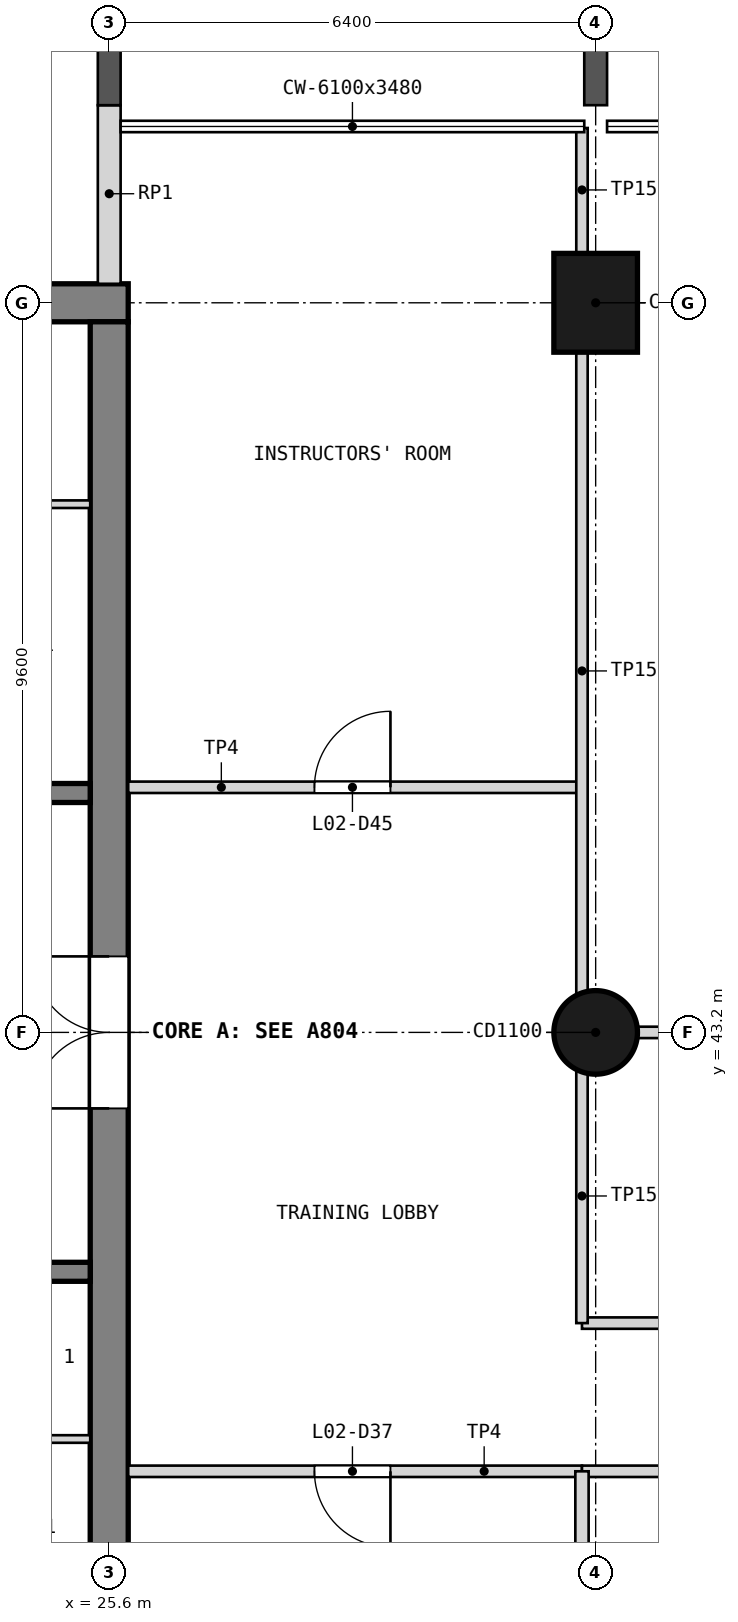
"""IFC4 building model, lengths in metres.
Left out: names, types, materials, properties, quantities, classifications, styles, units other than length and angle.
Written with IfcOpenShell. Run it as: python <this file> out.ifc"""

import sys

from ifc_helpers import new_model, si_unit, direction, frame, frame_2d, origin, origin_2d, place, context, subcontext, project, spatial, rectangle, circle, extrude, element, fill, save


model = new_model("IFC4")
c1 = context("Model", 3, precision=1e-05, world=origin(), true_north=direction((0.0, 1.0)))
c2 = subcontext(c1, "Body", "Model", "MODEL_VIEW")
j1 = project(units=[si_unit("LENGTHUNIT", "METRE"), si_unit("PLANEANGLEUNIT", "RADIAN")], contexts=[c1])
p1 = place(None, origin())
s1 = spatial("IfcSite", under=j1, at=p1, CompositionType="ELEMENT")
p2 = place(p1, origin())
s2 = spatial("IfcBuilding", under=s1, at=p2, CompositionType="ELEMENT")
p3 = place(p2, frame((0.0, 0.0, 8.4)))
s3 = spatial("IfcBuildingStorey", under=s2, at=p3, CompositionType="ELEMENT", Elevation=8.4)
p4 = place(p3, frame((12.55, 52.8, 0.0), z_axis=(0.0, 0.0, 1.0), x_axis=(1.0, 0.0, 0.0)))
e1 = element("IfcWall", 1, at=p4, inside=s3, PredefinedType="SHEAR", context=c2, shape_type="SweptSolid", body=[
    extrude(rectangle(XDim=13.3, YDim=0.5, at=frame_2d((6.65, 0.0))), origin(), (0.0, 0.0, 1.0), 4.5),
])
p5 = place(p4, frame((1.85, 0.0, 1.0)))
e2 = element("IfcOpeningElement", 2, at=p5, cuts=e1, PredefinedType="OPENING", context=c2, shape_type="SweptSolid", body=[
    extrude(rectangle(XDim=0.4, YDim=2.0, at=frame_2d((0.2, 1.0))), frame((0.0, 0.26, 0.0), z_axis=(0.0, -1.0, 0.0), x_axis=(1.0, 0.0, 0.0)), (0.0, 0.0, 1.0), 0.52),
])
p6 = place(p4, frame((4.65, 0.0, 0.0)))
e3 = element("IfcOpeningElement", 3, at=p6, cuts=e1, PredefinedType="OPENING", context=c2, shape_type="SweptSolid", body=[
    extrude(rectangle(XDim=2.0, YDim=2.1, at=frame_2d((1.0, 1.05))), frame((0.0, 0.26, 0.0), z_axis=(0.0, -1.0, 0.0), x_axis=(1.0, 0.0, 0.0)), (0.0, 0.0, 1.0), 0.52),
])
p7 = place(p3, frame((25.6, 33.85, 0.0), z_axis=(0.0, 0.0, 1.0), x_axis=(0.0, 1.0, 0.0)))
e4 = element("IfcWall", 4, at=p7, inside=s3, PredefinedType="SHEAR", context=c2, shape_type="SweptSolid", body=[
    extrude(rectangle(XDim=18.7, YDim=0.5, at=frame_2d((9.35, 0.0))), origin(), (0.0, 0.0, 1.0), 4.5),
])
p8 = place(p7, frame((8.35, 0.0, 0.0)))
e5 = element("IfcOpeningElement", 5, at=p8, cuts=e4, PredefinedType="OPENING", context=c2, shape_type="SweptSolid", body=[
    extrude(rectangle(XDim=2.0, YDim=2.1, at=frame_2d((1.0, 1.05))), frame((0.0, 0.26, 0.0), z_axis=(0.0, -1.0, 0.0), x_axis=(1.0, 0.0, 0.0)), (0.0, 0.0, 1.0), 0.52),
])
p9 = place(p3, frame((32.0, 43.2, 0.0), z_axis=(0.0, 0.0, 1.0), x_axis=(1.0, 0.0, 0.0)))
e6 = element("IfcColumn", 6, at=p9, inside=s3, PredefinedType="COLUMN", context=c2, shape_type="SweptSolid", body=[
    extrude(circle(Radius=0.55, at=origin_2d()), origin(), (0.0, 0.0, 1.0), 4.5),
])
p10 = place(p3, frame((32.0, 52.8, 0.0), z_axis=(0.0, 0.0, 1.0), x_axis=(1.0, 0.0, 0.0)))
e7 = element("IfcColumn", 7, at=p10, inside=s3, PredefinedType="COLUMN", context=c2, shape_type="SweptSolid", body=[
    extrude(rectangle(XDim=1.1, YDim=1.3, at=origin_2d()), origin(), (0.0, 0.0, 1.0), 4.5),
])
p11 = place(p3, frame((25.6, 53.05, 0.0), z_axis=(0.0, 0.0, 1.0), x_axis=(0.0, 1.0, 0.0)))
e8 = element("IfcWall", 8, at=p11, inside=s3, PredefinedType="SOLIDWALL", context=c2, shape_type="SweptSolid", body=[
    extrude(rectangle(XDim=2.35, YDim=0.3, at=frame_2d((1.175, 0.0))), origin(), (0.0, 0.0, 1.0), 3.48),
])
for number, where, z_axis, x_axis in (
    (9, (19.875, 40.05, 0.0), (0.0, 0.0, 1.0), (1.0, 0.0, 0.0)),
    (10, (19.875, 46.35, 0.0), (0.0, 0.0, 1.0), (1.0, 0.0, 0.0)),
):
    element("IfcWall", number, at=place(p3, frame(where, z_axis=z_axis, x_axis=x_axis)), inside=s3, PredefinedType="SOLIDWALL", context=c2, shape_type="SweptSolid", body=[
        extrude(rectangle(XDim=5.475, YDim=0.25, at=frame_2d((2.738, 0.0))), origin(), (0.0, 0.0, 1.0), 4.2),
    ])
p12 = place(p3, frame((21.675, 37.85, 0.0), z_axis=(0.0, 0.0, 1.0), x_axis=(1.0, 0.0, 0.0)))
e11 = element("IfcWall", 11, at=p12, inside=s3, PredefinedType="PARTITIONING", context=c2, shape_type="SweptSolid", body=[
    extrude(rectangle(XDim=3.675, YDim=0.1, at=frame_2d((1.837, 0.0))), origin(), (0.0, 0.0, 1.0), 4.2),
])
p13 = place(p3, frame((20.125, 50.15, 0.0), z_axis=(0.0, 0.0, 1.0), x_axis=(1.0, 0.0, 0.0)))
e12 = element("IfcWall", 12, at=p13, inside=s3, PredefinedType="PARTITIONING", context=c2, shape_type="SweptSolid", body=[
    extrude(rectangle(XDim=5.225, YDim=0.1, at=frame_2d((2.613, 0.0))), origin(), (0.0, 0.0, 1.0), 4.2),
])
p14 = place(p3, frame((25.85, 37.425, 0.0), z_axis=(0.0, 0.0, 1.0), x_axis=(1.0, 0.0, 0.0)))
e13 = element("IfcWall", 13, at=p14, inside=s3, PredefinedType="PARTITIONING", context=c2, shape_type="SweptSolid", body=[
    extrude(rectangle(XDim=5.97, YDim=0.15, at=frame_2d((2.985, 0.0))), origin(), (0.0, 0.0, 1.0), 4.28),
])
p15 = place(p14, frame((2.45, 0.0, 0.0)))
e14 = element("IfcOpeningElement", 14, at=p15, cuts=e13, PredefinedType="OPENING", context=c2, shape_type="SweptSolid", body=[
    extrude(rectangle(XDim=1.0, YDim=2.1, at=frame_2d((0.5, 1.05))), frame((0.0, 0.085, 0.0), z_axis=(0.0, -1.0, 0.0), x_axis=(1.0, 0.0, 0.0)), (0.0, 0.0, 1.0), 0.17),
])
p16 = place(p3, frame((31.82, 37.425, 0.0), z_axis=(0.0, 0.0, 1.0), x_axis=(1.0, 0.0, 0.0)))
e15 = element("IfcWall", 15, at=p16, inside=s3, PredefinedType="PARTITIONING", context=c2, shape_type="SweptSolid", body=[
    extrude(rectangle(XDim=6.4, YDim=0.15, at=frame_2d((3.2, 0.0))), origin(), (0.0, 0.0, 1.0), 4.28),
])
p17 = place(p16, frame((2.68, 0.0, 0.0)))
e16 = element("IfcOpeningElement", 16, at=p17, cuts=e15, PredefinedType="OPENING", context=c2, shape_type="SweptSolid", body=[
    extrude(rectangle(XDim=1.0, YDim=2.1, at=frame_2d((0.5, 1.05))), frame((0.0, 0.085, 0.0), z_axis=(0.0, -1.0, 0.0), x_axis=(1.0, 0.0, 0.0)), (0.0, 0.0, 1.0), 0.17),
])
p18 = place(p3, frame((31.82, 34.23, 0.0), z_axis=(0.0, 0.0, 1.0), x_axis=(0.0, 1.0, 0.0)))
e17 = element("IfcWall", 17, at=p18, inside=s3, PredefinedType="PARTITIONING", context=c2, shape_type="SweptSolid", body=[
    extrude(rectangle(XDim=3.195, YDim=0.175, at=frame_2d((1.598, 0.0))), origin(), (0.0, 0.0, 1.0), 3.38),
])
p19 = place(p3, frame((31.82, 39.375, 0.0), z_axis=(0.0, 0.0, 1.0), x_axis=(1.0, 0.0, 0.0)))
e18 = element("IfcWall", 18, at=p19, inside=s3, PredefinedType="PARTITIONING", context=c2, shape_type="SweptSolid", body=[
    extrude(rectangle(XDim=25.96, YDim=0.15, at=frame_2d((12.98, 0.0))), origin(), (0.0, 0.0, 1.0), 4.28),
])
p20 = place(p19, frame((5.63, 0.0, 0.0)))
e19 = element("IfcOpeningElement", 19, at=p20, cuts=e18, PredefinedType="OPENING", context=c2, shape_type="SweptSolid", body=[
    extrude(rectangle(XDim=1.8, YDim=2.1, at=frame_2d((0.9, 1.05))), frame((0.0, 0.085, 0.0), z_axis=(0.0, -1.0, 0.0), x_axis=(1.0, 0.0, 0.0)), (0.0, 0.0, 1.0), 0.17),
])
p21 = place(p19, frame((18.53, 0.0, 0.0)))
e20 = element("IfcOpeningElement", 20, at=p21, cuts=e18, PredefinedType="OPENING", context=c2, shape_type="SweptSolid", body=[
    extrude(rectangle(XDim=1.8, YDim=2.1, at=frame_2d((0.9, 1.05))), frame((0.0, 0.085, 0.0), z_axis=(0.0, -1.0, 0.0), x_axis=(1.0, 0.0, 0.0)), (0.0, 0.0, 1.0), 0.17),
])
p22 = place(p3, frame((31.82, 43.2, 0.0), z_axis=(0.0, 0.0, 1.0), x_axis=(1.0, 0.0, 0.0)))
e21 = element("IfcWall", 21, at=p22, inside=s3, PredefinedType="PARTITIONING", context=c2, shape_type="SweptSolid", body=[
    extrude(rectangle(XDim=25.96, YDim=0.15, at=frame_2d((12.98, 0.0))), origin(), (0.0, 0.0, 1.0), 3.48),
])
p23 = place(p22, frame((3.175, 0.0, 0.0)))
e22 = element("IfcOpeningElement", 22, at=p23, cuts=e21, PredefinedType="OPENING", context=c2, shape_type="SweptSolid", body=[
    extrude(rectangle(XDim=1.8, YDim=2.1, at=frame_2d((0.9, 1.05))), frame((0.0, 0.085, 0.0), z_axis=(0.0, -1.0, 0.0), x_axis=(1.0, 0.0, 0.0)), (0.0, 0.0, 1.0), 0.17),
])
p24 = place(p22, frame((10.325, 0.0, 0.0)))
e23 = element("IfcOpeningElement", 23, at=p24, cuts=e21, PredefinedType="OPENING", context=c2, shape_type="SweptSolid", body=[
    extrude(rectangle(XDim=1.8, YDim=2.1, at=frame_2d((0.9, 1.05))), frame((0.0, 0.085, 0.0), z_axis=(0.0, -1.0, 0.0), x_axis=(1.0, 0.0, 0.0)), (0.0, 0.0, 1.0), 0.17),
])
p25 = place(p22, frame((17.518, 0.0, 0.0)))
e24 = element("IfcOpeningElement", 24, at=p25, cuts=e21, PredefinedType="OPENING", context=c2, shape_type="SweptSolid", body=[
    extrude(rectangle(XDim=1.0, YDim=2.1, at=frame_2d((0.5, 1.05))), frame((0.0, 0.085, 0.0), z_axis=(0.0, -1.0, 0.0), x_axis=(1.0, 0.0, 0.0)), (0.0, 0.0, 1.0), 0.17),
])
p26 = place(p22, frame((22.607, 0.0, 0.0)))
e25 = element("IfcOpeningElement", 25, at=p26, cuts=e21, PredefinedType="OPENING", context=c2, shape_type="SweptSolid", body=[
    extrude(rectangle(XDim=1.8, YDim=2.1, at=frame_2d((0.9, 1.05))), frame((0.0, 0.085, 0.0), z_axis=(0.0, -1.0, 0.0), x_axis=(1.0, 0.0, 0.0)), (0.0, 0.0, 1.0), 0.17),
])
p27 = place(p3, frame((25.85, 46.425, 0.0), z_axis=(0.0, 0.0, 1.0), x_axis=(1.0, 0.0, 0.0)))
e26 = element("IfcWall", 26, at=p27, inside=s3, PredefinedType="PARTITIONING", context=c2, shape_type="SweptSolid", body=[
    extrude(rectangle(XDim=5.97, YDim=0.15, at=frame_2d((2.985, 0.0))), origin(), (0.0, 0.0, 1.0), 4.28),
])
p28 = place(p27, frame((2.45, 0.0, 0.0)))
e27 = element("IfcOpeningElement", 27, at=p28, cuts=e26, PredefinedType="OPENING", context=c2, shape_type="SweptSolid", body=[
    extrude(rectangle(XDim=1.0, YDim=2.1, at=frame_2d((0.5, 1.05))), frame((0.0, 0.085, 0.0), z_axis=(0.0, -1.0, 0.0), x_axis=(1.0, 0.0, 0.0)), (0.0, 0.0, 1.0), 0.17),
])
p29 = place(p3, frame((31.82, 39.375, 0.0), z_axis=(0.0, 0.0, 1.0), x_axis=(0.0, 1.0, 0.0)))
e28 = element("IfcWall", 28, at=p29, inside=s3, PredefinedType="PARTITIONING", context=c2, shape_type="SweptSolid", body=[
    extrude(rectangle(XDim=3.325, YDim=0.15, at=frame_2d((1.663, 0.0))), origin(), (0.0, 0.0, 1.0), 3.38),
])
p30 = place(p3, frame((31.82, 43.7, 0.0), z_axis=(0.0, 0.0, 1.0), x_axis=(0.0, 1.0, 0.0)))
e29 = element("IfcWall", 29, at=p30, inside=s3, PredefinedType="PARTITIONING", context=c2, shape_type="SweptSolid", body=[
    extrude(rectangle(XDim=8.47, YDim=0.15, at=frame_2d((4.235, 0.0))), origin(), (0.0, 0.0, 1.0), 3.38),
])
p31 = place(p3, frame((31.82, 53.43, 0.0), z_axis=(0.0, 0.0, 1.0), x_axis=(0.0, 1.0, 0.0)))
e30 = element("IfcWall", 30, at=p31, inside=s3, PredefinedType="PARTITIONING", context=c2, shape_type="SweptSolid", body=[
    extrude(rectangle(XDim=1.67, YDim=0.15, at=frame_2d((0.835, 0.0))), origin(), (0.0, 0.0, 1.0), 3.38),
])
p32 = place(p8, origin())
e31 = element("IfcDoor", 31, at=p32, inside=s3, OperationType="DOUBLE_DOOR_SINGLE_SWING", PredefinedType="DOOR", context=c2, shape_type="SweptSolid", body=[
    extrude(rectangle(XDim=2.0, YDim=2.1, at=frame_2d((1.0, 1.05))), frame((0.0, 0.025, 0.0), z_axis=(0.0, -1.0, 0.0), x_axis=(1.0, 0.0, 0.0)), (0.0, 0.0, 1.0), 0.05),
])
fill(e5, e31)
p33 = place(p15, frame((1.0, 0.0, 0.0), z_axis=(0.0, 0.0, 1.0), x_axis=(-1.0, 0.0, 0.0)))
e32 = element("IfcDoor", 32, at=p33, inside=s3, OperationType="SINGLE_SWING_LEFT", PredefinedType="DOOR", context=c2, shape_type="SweptSolid", body=[
    extrude(rectangle(XDim=1.0, YDim=2.1, at=frame_2d((0.5, 1.05))), frame((0.0, 0.025, 0.0), z_axis=(0.0, -1.0, 0.0), x_axis=(1.0, 0.0, 0.0)), (0.0, 0.0, 1.0), 0.05),
])
fill(e14, e32)
p34 = place(p28, origin())
e33 = element("IfcDoor", 33, at=p34, inside=s3, OperationType="SINGLE_SWING_RIGHT", PredefinedType="DOOR", context=c2, shape_type="SweptSolid", body=[
    extrude(rectangle(XDim=1.0, YDim=2.1, at=frame_2d((0.5, 1.05))), frame((0.0, 0.025, 0.0), z_axis=(0.0, -1.0, 0.0), x_axis=(1.0, 0.0, 0.0)), (0.0, 0.0, 1.0), 0.05),
])
fill(e27, e33)
save(model, sys.argv[1])
